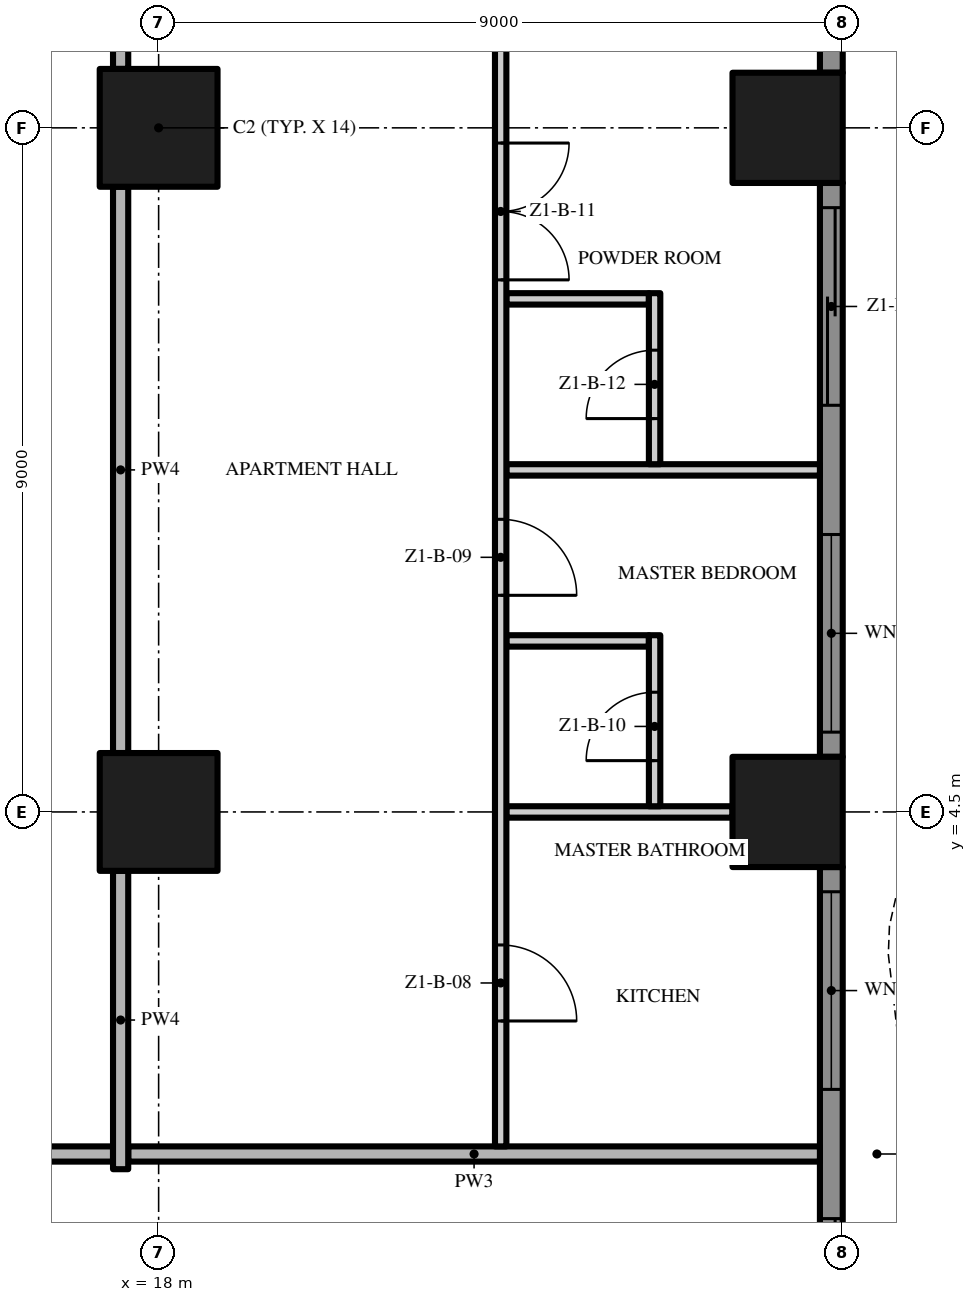
"""IFC4 building model, lengths in metres.
Left out: names, types, materials, properties, quantities, classifications, styles, units other than length and angle.
Written with IfcOpenShell. Run it as: python <this file> out.ifc"""

import sys

from ifc_helpers import new_model, si_unit, direction, frame, frame_2d, origin, origin_2d, place, context, subcontext, project, spatial, polyline, rectangle, outline, extrude, element, fill, save


model = new_model("IFC4")
c1 = context("Model", 3, precision=1e-05, world=origin(), true_north=direction((0.0, 1.0)))
c2 = subcontext(c1, "Body", "Model", "MODEL_VIEW")
j1 = project(units=[si_unit("LENGTHUNIT", "METRE"), si_unit("PLANEANGLEUNIT", "RADIAN")], contexts=[c1])
p1 = place(None, origin())
s1 = spatial("IfcSite", under=j1, at=p1, CompositionType="ELEMENT")
p2 = place(p1, origin())
s2 = spatial("IfcBuilding", under=s1, at=p2, CompositionType="ELEMENT")
p3 = place(p2, frame((0.0, 0.0, 26.4)))
s3 = spatial("IfcBuildingStorey", under=s2, at=p3, CompositionType="ELEMENT", Elevation=26.4)
for number, where, z_axis, x_axis in (
    (1, (18.0, 13.5, 0.0), (0.0, 0.0, 1.0), (1.0, 0.0, 0.0)),
    (2, (18.0, 4.5, 0.0), (0.0, 0.0, 1.0), (1.0, 0.0, 0.0)),
):
    element("IfcColumn", number, at=place(p3, frame(where, z_axis=z_axis, x_axis=x_axis)), inside=s3, PredefinedType="COLUMN", context=c2, shape_type="SweptSolid", body=[
        extrude(rectangle(XDim=1.55, YDim=1.55, at=origin_2d()), origin(), (0.0, 0.0, 1.0), 3.5),
    ])
for number, where, z_axis, x_axis in (
    (3, (26.275, 13.5, 0.0), (0.0, 0.0, 1.0), (1.0, 0.0, 0.0)),
    (4, (26.275, 4.5, 0.0), (0.0, 0.0, 1.0), (1.0, 0.0, 0.0)),
):
    element("IfcColumn", number, at=place(p3, frame(where, z_axis=z_axis, x_axis=x_axis)), inside=s3, PredefinedType="COLUMN", context=c2, shape_type="SweptSolid", body=[
        extrude(rectangle(XDim=1.45, YDim=1.45, at=origin_2d()), origin(), (0.0, 0.0, 1.0), 3.5),
    ])
p4 = place(p3, frame((26.85, 3.775, 0.0), z_axis=(0.0, 0.0, 1.0), x_axis=(0.0, -1.0, 0.0)))
e5 = element("IfcWall", 5, at=p4, inside=s3, PredefinedType="SOLIDWALL", context=c2, shape_type="SweptSolid", body=[
    extrude(rectangle(XDim=7.55, YDim=0.3, at=frame_2d((3.775, 0.0))), origin(), (0.0, 0.0, 1.0), 3.5),
])
p5 = place(p4, frame((4.625, 0.0, 0.0)))
e6 = element("IfcOpeningElement", 6, at=p5, cuts=e5, PredefinedType="OPENING", context=c2, shape_type="SweptSolid", body=[
    extrude(rectangle(XDim=2.6, YDim=2.4, at=frame_2d((1.3, 1.2))), frame((0.0, 0.16, 0.0), z_axis=(0.0, -1.0, 0.0), x_axis=(1.0, 0.0, 0.0)), (0.0, 0.0, 1.0), 0.32),
])
p6 = place(p4, frame((0.325, 0.0, 0.45)))
e7 = element("IfcOpeningElement", 7, at=p6, cuts=e5, PredefinedType="OPENING", context=c2, shape_type="SweptSolid", body=[
    extrude(rectangle(XDim=2.6, YDim=2.65, at=frame_2d((1.3, 1.325))), frame((0.0, 0.16, 0.0), z_axis=(0.0, -1.0, 0.0), x_axis=(1.0, 0.0, 0.0)), (0.0, 0.0, 1.0), 0.32),
])
p7 = place(p3, frame((26.85, 12.775, 0.0), z_axis=(0.0, 0.0, 1.0), x_axis=(0.0, -1.0, 0.0)))
e8 = element("IfcWall", 8, at=p7, inside=s3, PredefinedType="SOLIDWALL", context=c2, shape_type="SweptSolid", body=[
    extrude(rectangle(XDim=7.55, YDim=0.3, at=frame_2d((3.775, 0.0))), origin(), (0.0, 0.0, 1.0), 3.5),
])
p8 = place(p7, frame((4.625, 0.0, 0.45)))
e9 = element("IfcOpeningElement", 9, at=p8, cuts=e8, PredefinedType="OPENING", context=c2, shape_type="SweptSolid", body=[
    extrude(rectangle(XDim=2.6, YDim=2.65, at=frame_2d((1.3, 1.325))), frame((0.0, 0.16, 0.0), z_axis=(0.0, -1.0, 0.0), x_axis=(1.0, 0.0, 0.0)), (0.0, 0.0, 1.0), 0.32),
])
p9 = place(p7, frame((0.325, 0.0, 0.0)))
e10 = element("IfcOpeningElement", 10, at=p9, cuts=e8, PredefinedType="OPENING", context=c2, shape_type="SweptSolid", body=[
    extrude(rectangle(XDim=2.6, YDim=2.4, at=frame_2d((1.3, 1.2))), frame((0.0, 0.16, 0.0), z_axis=(0.0, -1.0, 0.0), x_axis=(1.0, 0.0, 0.0)), (0.0, 0.0, 1.0), 0.32),
])
p10 = place(p3, frame((26.85, 18.0, 0.0), z_axis=(0.0, 0.0, 1.0), x_axis=(0.0, -1.0, 0.0)))
e11 = element("IfcWall", 11, at=p10, inside=s3, PredefinedType="SOLIDWALL", context=c2, shape_type="SweptSolid", body=[
    extrude(rectangle(XDim=3.775, YDim=0.3, at=frame_2d((1.887, 0.0))), origin(), (0.0, 0.0, 1.0), 3.5),
])
p11 = place(p10, frame((0.85, 0.0, 0.45)))
e12 = element("IfcOpeningElement", 12, at=p11, cuts=e11, PredefinedType="OPENING", context=c2, shape_type="SweptSolid", body=[
    extrude(rectangle(XDim=2.6, YDim=2.65, at=frame_2d((1.3, 1.325))), frame((0.0, 0.16, 0.0), z_axis=(0.0, -1.0, 0.0), x_axis=(1.0, 0.0, 0.0)), (0.0, 0.0, 1.0), 0.32),
])
p12 = place(p3, origin())
e13 = element("IfcWall", 13, at=p12, inside=s3, PredefinedType="USERDEFINED", context=c2, shape_type="SweptSolid", body=[
    extrude(outline(polyline([(29.649, -18.0), (28.988, -16.5), (28.255, -15.0), (27.731, -13.5), (27.6, -12.375), (27.615, -12.0), (27.951, -10.5), (28.612, -9.0), (29.345, -7.5), (29.869, -6.0), (30.0, -4.875), (29.985, -4.5), (29.649, -3.0), (28.988, -1.5), (28.255, 0.0), (27.731, 1.5), (27.6, 2.625), (27.615, 3.0), (27.951, 4.5), (28.612, 6.0), (29.345, 7.5), (29.869, 9.0), (30.0, 10.125), (29.985, 10.5), (29.649, 12.0), (28.988, 13.5), (28.255, 15.0), (27.731, 16.5), (27.6, 17.625), (27.615, 18.0), (27.365, 18.01), (27.349, 17.615), (27.486, 16.444), (28.024, 14.904), (28.761, 13.395), (29.41, 11.921), (29.736, 10.467), (29.749, 10.135), (29.624, 9.056), (29.114, 7.596), (28.385, 6.105), (27.713, 4.579), (27.366, 3.033), (27.349, 2.615), (27.486, 1.444), (28.024, -0.096), (28.761, -1.605), (29.41, -3.079), (29.736, -4.533), (29.749, -4.865), (29.624, -5.944), (29.114, -7.404), (28.385, -8.895), (27.713, -10.421), (27.366, -11.967), (27.349, -12.385), (27.486, -13.556), (28.024, -15.096), (28.761, -16.605), (29.42, -18.101), (29.649, -18.0)])), origin(), (0.0, 0.0, 1.0), 0.9),
])
p13 = place(p3, frame((17.4, 0.0, 0.0), z_axis=(0.0, 0.0, 1.0), x_axis=(-1.0, 0.0, 0.0)))
e14 = element("IfcWall", 14, at=p13, inside=s3, PredefinedType="PARTITIONING", context=c2, shape_type="SweptSolid", body=[
    extrude(rectangle(XDim=17.3, YDim=0.2, at=frame_2d((8.65, 0.0))), origin(), (0.0, 0.0, 1.0), 3.5),
])
p14 = place(p13, frame((7.65, 0.0, 0.0)))
e15 = element("IfcOpeningElement", 15, at=p14, cuts=e14, PredefinedType="OPENING", context=c2, shape_type="SweptSolid", body=[
    extrude(rectangle(XDim=1.5, YDim=2.4, at=frame_2d((0.75, 1.2))), frame((0.0, 0.11, 0.0), z_axis=(0.0, -1.0, 0.0), x_axis=(1.0, 0.0, 0.0)), (0.0, 0.0, 1.0), 0.22),
])
p15 = place(p3, frame((17.6, 0.0, 0.0), z_axis=(0.0, 0.0, 1.0), x_axis=(1.0, 0.0, 0.0)))
e16 = element("IfcWall", 16, at=p15, inside=s3, PredefinedType="PARTITIONING", context=c2, shape_type="SweptSolid", body=[
    extrude(rectangle(XDim=9.1, YDim=0.2, at=frame_2d((4.55, 0.0))), origin(), (0.0, 0.0, 1.0), 3.5),
])
p16 = place(p3, frame((22.575, 4.5, 0.0), z_axis=(0.0, 0.0, 1.0), x_axis=(1.0, 0.0, 0.0)))
e17 = element("IfcWall", 17, at=p16, inside=s3, PredefinedType="PARTITIONING", context=c2, shape_type="SweptSolid", body=[
    extrude(rectangle(XDim=2.975, YDim=0.15, at=frame_2d((1.488, 0.0))), origin(), (0.0, 0.0, 1.0), 3.5),
])
p17 = place(p3, frame((22.575, 6.75, 0.0), z_axis=(0.0, 0.0, 1.0), x_axis=(1.0, 0.0, 0.0)))
e18 = element("IfcWall", 18, at=p17, inside=s3, PredefinedType="PARTITIONING", context=c2, shape_type="SweptSolid", body=[
    extrude(rectangle(XDim=1.875, YDim=0.15, at=frame_2d((0.938, 0.0))), origin(), (0.0, 0.0, 1.0), 3.5),
])
p18 = place(p3, frame((22.575, 9.0, 0.0), z_axis=(0.0, 0.0, 1.0), x_axis=(1.0, 0.0, 0.0)))
e19 = element("IfcWall", 19, at=p18, inside=s3, PredefinedType="PARTITIONING", context=c2, shape_type="SweptSolid", body=[
    extrude(rectangle(XDim=4.125, YDim=0.15, at=frame_2d((2.062, 0.0))), origin(), (0.0, 0.0, 1.0), 3.5),
])
p19 = place(p3, frame((22.575, 11.25, 0.0), z_axis=(0.0, 0.0, 1.0), x_axis=(1.0, 0.0, 0.0)))
e20 = element("IfcWall", 20, at=p19, inside=s3, PredefinedType="PARTITIONING", context=c2, shape_type="SweptSolid", body=[
    extrude(rectangle(XDim=1.875, YDim=0.15, at=frame_2d((0.938, 0.0))), origin(), (0.0, 0.0, 1.0), 3.5),
])
p20 = place(p3, frame((17.5, -0.2, 0.0), z_axis=(0.0, 0.0, 1.0), x_axis=(0.0, 1.0, 0.0)))
e21 = element("IfcWall", 21, at=p20, inside=s3, PredefinedType="PARTITIONING", context=c2, shape_type="SweptSolid", body=[
    extrude(rectangle(XDim=3.925, YDim=0.2, at=frame_2d((1.962, 0.0))), origin(), (0.0, 0.0, 1.0), 3.5),
])
p21 = place(p3, frame((17.5, 5.275, 0.0), z_axis=(0.0, 0.0, 1.0), x_axis=(0.0, 1.0, 0.0)))
e22 = element("IfcWall", 22, at=p21, inside=s3, PredefinedType="PARTITIONING", context=c2, shape_type="SweptSolid", body=[
    extrude(rectangle(XDim=7.45, YDim=0.2, at=frame_2d((3.725, 0.0))), origin(), (0.0, 0.0, 1.0), 3.5),
])
p22 = place(p3, frame((17.5, 21.05, 0.0), z_axis=(0.0, 0.0, 1.0), x_axis=(0.0, -1.0, 0.0)))
e23 = element("IfcWall", 23, at=p22, inside=s3, PredefinedType="PARTITIONING", context=c2, shape_type="SweptSolid", body=[
    extrude(rectangle(XDim=6.775, YDim=0.2, at=frame_2d((3.388, 0.0))), origin(), (0.0, 0.0, 1.0), 3.5),
])
p23 = place(p22, frame((4.725, 0.0, 0.0)))
e24 = element("IfcOpeningElement", 24, at=p23, cuts=e23, PredefinedType="OPENING", context=c2, shape_type="SweptSolid", body=[
    extrude(rectangle(XDim=1.2, YDim=2.4, at=frame_2d((0.6, 1.2))), frame((0.0, 0.11, 0.0), z_axis=(0.0, -1.0, 0.0), x_axis=(1.0, 0.0, 0.0)), (0.0, 0.0, 1.0), 0.22),
])
p24 = place(p3, frame((22.5, 17.275, 0.0), z_axis=(0.0, 0.0, 1.0), x_axis=(0.0, -1.0, 0.0)))
e25 = element("IfcWall", 25, at=p24, inside=s3, PredefinedType="PARTITIONING", context=c2, shape_type="SweptSolid", body=[
    extrude(rectangle(XDim=17.175, YDim=0.15, at=frame_2d((8.588, 0.0))), origin(), (0.0, 0.0, 1.0), 3.5),
])
p25 = place(p24, frame((14.525, 0.0, 0.0)))
e26 = element("IfcOpeningElement", 26, at=p25, cuts=e25, PredefinedType="OPENING", context=c2, shape_type="SweptSolid", body=[
    extrude(rectangle(XDim=1.0, YDim=2.4, at=frame_2d((0.5, 1.2))), frame((0.0, 0.085, 0.0), z_axis=(0.0, -1.0, 0.0), x_axis=(1.0, 0.0, 0.0)), (0.0, 0.0, 1.0), 0.17),
])
p26 = place(p24, frame((8.925, 0.0, 0.0)))
e27 = element("IfcOpeningElement", 27, at=p26, cuts=e25, PredefinedType="OPENING", context=c2, shape_type="SweptSolid", body=[
    extrude(rectangle(XDim=1.0, YDim=2.4, at=frame_2d((0.5, 1.2))), frame((0.0, 0.085, 0.0), z_axis=(0.0, -1.0, 0.0), x_axis=(1.0, 0.0, 0.0)), (0.0, 0.0, 1.0), 0.17),
])
p27 = place(p24, frame((3.975, 0.0, 0.0)))
e28 = element("IfcOpeningElement", 28, at=p27, cuts=e25, PredefinedType="OPENING", context=c2, shape_type="SweptSolid", body=[
    extrude(rectangle(XDim=1.8, YDim=2.4, at=frame_2d((0.9, 1.2))), frame((0.0, 0.085, 0.0), z_axis=(0.0, -1.0, 0.0), x_axis=(1.0, 0.0, 0.0)), (0.0, 0.0, 1.0), 0.17),
])
p28 = place(p3, frame((24.525, 4.575, 0.0), z_axis=(0.0, 0.0, 1.0), x_axis=(0.0, 1.0, 0.0)))
e29 = element("IfcWall", 29, at=p28, inside=s3, PredefinedType="PARTITIONING", context=c2, shape_type="SweptSolid", body=[
    extrude(rectangle(XDim=2.25, YDim=0.15, at=frame_2d((1.125, 0.0))), origin(), (0.0, 0.0, 1.0), 3.5),
])
p29 = place(p28, frame((0.6, 0.0, 0.0)))
e30 = element("IfcOpeningElement", 30, at=p29, cuts=e29, PredefinedType="OPENING", context=c2, shape_type="SweptSolid", body=[
    extrude(rectangle(XDim=0.9, YDim=2.1, at=frame_2d((0.45, 1.05))), frame((0.0, 0.085, 0.0), z_axis=(0.0, -1.0, 0.0), x_axis=(1.0, 0.0, 0.0)), (0.0, 0.0, 1.0), 0.17),
])
p30 = place(p3, frame((24.525, 9.075, 0.0), z_axis=(0.0, 0.0, 1.0), x_axis=(0.0, 1.0, 0.0)))
e31 = element("IfcWall", 31, at=p30, inside=s3, PredefinedType="PARTITIONING", context=c2, shape_type="SweptSolid", body=[
    extrude(rectangle(XDim=2.25, YDim=0.15, at=frame_2d((1.125, 0.0))), origin(), (0.0, 0.0, 1.0), 3.5),
])
p31 = place(p30, frame((0.6, 0.0, 0.0)))
e32 = element("IfcOpeningElement", 32, at=p31, cuts=e31, PredefinedType="OPENING", context=c2, shape_type="SweptSolid", body=[
    extrude(rectangle(XDim=0.9, YDim=2.1, at=frame_2d((0.45, 1.05))), frame((0.0, 0.085, 0.0), z_axis=(0.0, -1.0, 0.0), x_axis=(1.0, 0.0, 0.0)), (0.0, 0.0, 1.0), 0.17),
])
p32 = place(p5, origin())
e33 = element("IfcDoor", 33, at=p32, inside=s3, OperationType="SINGLE_SWING_LEFT", PredefinedType="DOOR", context=c2, shape_type="SweptSolid", body=[
    extrude(rectangle(XDim=2.6, YDim=2.4, at=frame_2d((1.3, 1.2))), frame((0.0, 0.025, 0.0), z_axis=(0.0, -1.0, 0.0), x_axis=(1.0, 0.0, 0.0)), (0.0, 0.0, 1.0), 0.05),
])
fill(e6, e33)
p33 = place(p6, origin())
e34 = element("IfcWindow", 34, at=p33, inside=s3, PartitioningType="SINGLE_PANEL", PredefinedType="WINDOW", context=c2, shape_type="SweptSolid", body=[
    extrude(rectangle(XDim=2.6, YDim=2.65, at=frame_2d((1.3, 1.325))), frame((0.0, 0.03, 0.0), z_axis=(0.0, -1.0, 0.0), x_axis=(1.0, 0.0, 0.0)), (0.0, 0.0, 1.0), 0.06),
])
fill(e7, e34)
p34 = place(p8, origin())
e35 = element("IfcWindow", 35, at=p34, inside=s3, PartitioningType="SINGLE_PANEL", PredefinedType="WINDOW", context=c2, shape_type="SweptSolid", body=[
    extrude(rectangle(XDim=2.6, YDim=2.65, at=frame_2d((1.3, 1.325))), frame((0.0, 0.03, 0.0), z_axis=(0.0, -1.0, 0.0), x_axis=(1.0, 0.0, 0.0)), (0.0, 0.0, 1.0), 0.06),
])
fill(e9, e35)
p35 = place(p9, origin())
e36 = element("IfcDoor", 36, at=p35, inside=s3, OperationType="SINGLE_SWING_LEFT", PredefinedType="DOOR", context=c2, shape_type="SweptSolid", body=[
    extrude(rectangle(XDim=2.6, YDim=2.4, at=frame_2d((1.3, 1.2))), frame((0.0, 0.025, 0.0), z_axis=(0.0, -1.0, 0.0), x_axis=(1.0, 0.0, 0.0)), (0.0, 0.0, 1.0), 0.05),
])
fill(e10, e36)
p36 = place(p25, origin())
e37 = element("IfcDoor", 37, at=p36, inside=s3, OperationType="SINGLE_SWING_RIGHT", PredefinedType="DOOR", context=c2, shape_type="SweptSolid", body=[
    extrude(rectangle(XDim=1.0, YDim=2.4, at=frame_2d((0.5, 1.2))), frame((0.0, 0.025, 0.0), z_axis=(0.0, -1.0, 0.0), x_axis=(1.0, 0.0, 0.0)), (0.0, 0.0, 1.0), 0.05),
])
fill(e26, e37)
p37 = place(p26, origin())
e38 = element("IfcDoor", 38, at=p37, inside=s3, OperationType="SINGLE_SWING_RIGHT", PredefinedType="DOOR", context=c2, shape_type="SweptSolid", body=[
    extrude(rectangle(XDim=1.0, YDim=2.4, at=frame_2d((0.5, 1.2))), frame((0.0, 0.025, 0.0), z_axis=(0.0, -1.0, 0.0), x_axis=(1.0, 0.0, 0.0)), (0.0, 0.0, 1.0), 0.05),
])
fill(e27, e38)
p38 = place(p29, origin())
e39 = element("IfcDoor", 39, at=p38, inside=s3, OperationType="SINGLE_SWING_LEFT", PredefinedType="DOOR", context=c2, shape_type="SweptSolid", body=[
    extrude(rectangle(XDim=0.9, YDim=2.1, at=frame_2d((0.45, 1.05))), frame((0.0, 0.025, 0.0), z_axis=(0.0, -1.0, 0.0), x_axis=(1.0, 0.0, 0.0)), (0.0, 0.0, 1.0), 0.05),
])
fill(e30, e39)
p39 = place(p27, origin())
e40 = element("IfcDoor", 40, at=p39, inside=s3, OperationType="DOUBLE_DOOR_SINGLE_SWING", PredefinedType="DOOR", context=c2, shape_type="SweptSolid", body=[
    extrude(rectangle(XDim=1.8, YDim=2.4, at=frame_2d((0.9, 1.2))), frame((0.0, 0.025, 0.0), z_axis=(0.0, -1.0, 0.0), x_axis=(1.0, 0.0, 0.0)), (0.0, 0.0, 1.0), 0.05),
])
fill(e28, e40)
p40 = place(p31, origin())
e41 = element("IfcDoor", 41, at=p40, inside=s3, OperationType="SINGLE_SWING_LEFT", PredefinedType="DOOR", context=c2, shape_type="SweptSolid", body=[
    extrude(rectangle(XDim=0.9, YDim=2.1, at=frame_2d((0.45, 1.05))), frame((0.0, 0.025, 0.0), z_axis=(0.0, -1.0, 0.0), x_axis=(1.0, 0.0, 0.0)), (0.0, 0.0, 1.0), 0.05),
])
fill(e32, e41)
save(model, sys.argv[1])
